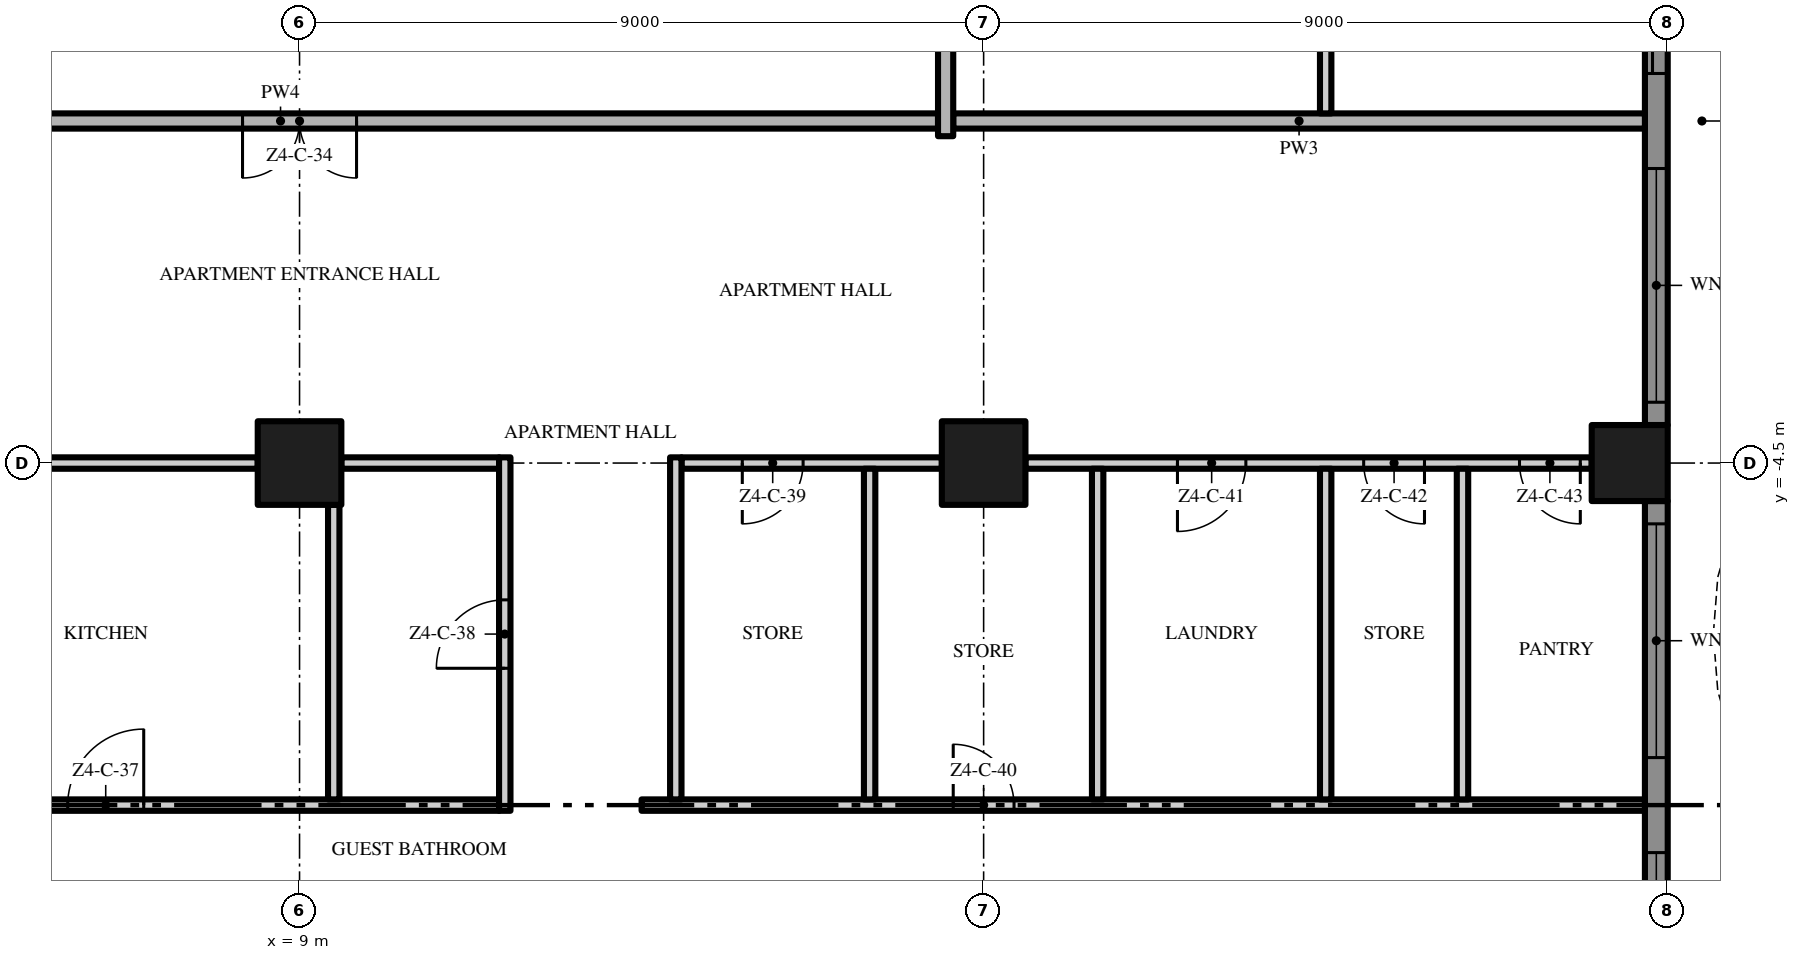
"""IFC4 building model, lengths in metres.
Left out: names, types, materials, properties, quantities, classifications, styles, units other than length and angle.
Written with IfcOpenShell. Run it as: python <this file> out.ifc"""

import sys

from ifc_helpers import new_model, si_unit, direction, frame, frame_2d, origin, origin_2d, place, context, subcontext, project, spatial, polyline, rectangle, outline, extrude, element, fill, save


model = new_model("IFC4")
c1 = context("Model", 3, precision=1e-05, world=origin(), true_north=direction((0.0, 1.0)))
c2 = subcontext(c1, "Body", "Model", "MODEL_VIEW")
j1 = project(units=[si_unit("LENGTHUNIT", "METRE"), si_unit("PLANEANGLEUNIT", "RADIAN")], contexts=[c1])
p1 = place(None, origin())
s1 = spatial("IfcSite", under=j1, at=p1, CompositionType="ELEMENT")
p2 = place(p1, origin())
s2 = spatial("IfcBuilding", under=s1, at=p2, CompositionType="ELEMENT")
p3 = place(p2, frame((0.0, 0.0, 211.0)))
s3 = spatial("IfcBuildingStorey", under=s2, at=p3, CompositionType="ELEMENT", Elevation=211.0)
p4 = place(p3, frame((18.0, -4.5, 0.0), z_axis=(0.0, 0.0, 1.0), x_axis=(1.0, 0.0, 0.0)))
e1 = element("IfcColumn", 1, at=p4, inside=s3, PredefinedType="COLUMN", context=c2, shape_type="SweptSolid", body=[
    extrude(rectangle(XDim=1.1, YDim=1.1, at=origin_2d()), origin(), (0.0, 0.0, 1.0), 3.5),
])
p5 = place(p3, frame((26.5, -4.5, 0.0), z_axis=(0.0, 0.0, 1.0), x_axis=(1.0, 0.0, 0.0)))
e2 = element("IfcColumn", 2, at=p5, inside=s3, PredefinedType="COLUMN", context=c2, shape_type="SweptSolid", body=[
    extrude(rectangle(XDim=1.0, YDim=1.0, at=origin_2d()), origin(), (0.0, 0.0, 1.0), 3.5),
])
p6 = place(p3, frame((9.0, -4.5, 0.0), z_axis=(0.0, 0.0, 1.0), x_axis=(1.0, 0.0, 0.0)))
e3 = element("IfcColumn", 3, at=p6, inside=s3, PredefinedType="COLUMN", context=c2, shape_type="SweptSolid", body=[
    extrude(rectangle(XDim=1.1, YDim=1.1, at=origin_2d()), origin(), (0.0, 0.0, 1.0), 3.5),
])
p7 = place(p3, frame((26.85, -5.0, 0.0), z_axis=(0.0, 0.0, 1.0), x_axis=(0.0, -1.0, 0.0)))
e4 = element("IfcWall", 4, at=p7, inside=s3, PredefinedType="SOLIDWALL", context=c2, shape_type="SweptSolid", body=[
    extrude(rectangle(XDim=8.0, YDim=0.3, at=frame_2d((4.0, 0.0))), origin(), (0.0, 0.0, 1.0), 3.5),
])
p8 = place(p7, frame((4.625, 0.0, 0.45)))
e5 = element("IfcOpeningElement", 5, at=p8, cuts=e4, PredefinedType="OPENING", context=c2, shape_type="SweptSolid", body=[
    extrude(rectangle(XDim=3.075, YDim=2.65, at=frame_2d((1.538, 1.325))), frame((0.0, 0.16, 0.0), z_axis=(0.0, -1.0, 0.0), x_axis=(1.0, 0.0, 0.0)), (0.0, 0.0, 1.0), 0.32),
])
p9 = place(p7, frame((0.3, 0.0, 0.45)))
e6 = element("IfcOpeningElement", 6, at=p9, cuts=e4, PredefinedType="OPENING", context=c2, shape_type="SweptSolid", body=[
    extrude(rectangle(XDim=3.075, YDim=2.65, at=frame_2d((1.538, 1.325))), frame((0.0, 0.16, 0.0), z_axis=(0.0, -1.0, 0.0), x_axis=(1.0, 0.0, 0.0)), (0.0, 0.0, 1.0), 0.32),
])
p10 = place(p3, frame((26.85, 4.0, 0.0), z_axis=(0.0, 0.0, 1.0), x_axis=(0.0, -1.0, 0.0)))
e7 = element("IfcWall", 7, at=p10, inside=s3, PredefinedType="SOLIDWALL", context=c2, shape_type="SweptSolid", body=[
    extrude(rectangle(XDim=8.0, YDim=0.3, at=frame_2d((4.0, 0.0))), origin(), (0.0, 0.0, 1.0), 3.5),
])
p11 = place(p10, frame((4.625, 0.0, 0.45)))
e8 = element("IfcOpeningElement", 8, at=p11, cuts=e7, PredefinedType="OPENING", context=c2, shape_type="SweptSolid", body=[
    extrude(rectangle(XDim=3.075, YDim=2.65, at=frame_2d((1.538, 1.325))), frame((0.0, 0.16, 0.0), z_axis=(0.0, -1.0, 0.0), x_axis=(1.0, 0.0, 0.0)), (0.0, 0.0, 1.0), 0.32),
])
p12 = place(p10, frame((0.3, 0.0, 0.0)))
e9 = element("IfcOpeningElement", 9, at=p12, cuts=e7, PredefinedType="OPENING", context=c2, shape_type="SweptSolid", body=[
    extrude(rectangle(XDim=3.075, YDim=2.4, at=frame_2d((1.538, 1.2))), frame((0.0, 0.16, 0.0), z_axis=(0.0, -1.0, 0.0), x_axis=(1.0, 0.0, 0.0)), (0.0, 0.0, 1.0), 0.32),
])
p13 = place(p3, origin())
e10 = element("IfcWall", 10, at=p13, inside=s3, PredefinedType="USERDEFINED", context=c2, shape_type="SweptSolid", body=[
    extrude(outline(polyline([(28.8, -18.0), (29.505, -16.5), (29.941, -15.0), (30.0, -14.25), (29.941, -13.5), (29.505, -12.0), (28.8, -10.5), (28.095, -9.0), (27.659, -7.5), (27.6, -6.75), (27.659, -6.0), (28.095, -4.5), (28.8, -3.0), (29.505, -1.5), (29.941, 0.0), (30.0, 0.75), (29.941, 1.5), (29.505, 3.0), (28.8, 4.5), (28.095, 6.0), (27.659, 7.5), (27.6, 8.25), (27.659, 9.0), (28.095, 10.5), (28.8, 12.0), (29.505, 13.5), (29.941, 15.0), (30.0, 15.75), (29.941, 16.5), (29.505, 18.0), (29.265, 17.93), (29.694, 16.455), (29.749, 15.75), (29.694, 15.045), (29.271, 13.589), (28.574, 12.106), (27.86, 10.589), (27.411, 9.045), (27.349, 8.25), (27.411, 7.455), (27.86, 5.911), (28.574, 4.394), (29.271, 2.911), (29.694, 1.455), (29.749, 0.75), (29.694, 0.045), (29.271, -1.411), (28.574, -2.894), (27.86, -4.411), (27.411, -5.955), (27.349, -6.75), (27.411, -7.545), (27.86, -9.089), (28.574, -10.606), (29.271, -12.089), (29.694, -13.545), (29.749, -14.25), (29.694, -14.955), (29.271, -16.411), (28.574, -17.894), (28.8, -18.0)])), origin(), (0.0, 0.0, 1.0), 0.9),
])
p14 = place(p3, frame((0.1, -9.0, 0.0), z_axis=(0.0, 0.0, 1.0), x_axis=(1.0, 0.0, 0.0)))
e11 = element("IfcWall", 11, at=p14, inside=s3, PredefinedType="PARTITIONING", context=c2, shape_type="SweptSolid", body=[
    extrude(rectangle(XDim=11.525, YDim=0.15, at=frame_2d((5.763, 0.0))), origin(), (0.0, 0.0, 1.0), 3.5),
])
p15 = place(p14, frame((5.85, 0.0, 0.0)))
e12 = element("IfcOpeningElement", 12, at=p15, cuts=e11, PredefinedType="OPENING", context=c2, shape_type="SweptSolid", body=[
    extrude(rectangle(XDim=1.0, YDim=2.4, at=frame_2d((0.5, 1.2))), frame((0.0, 0.085, 0.0), z_axis=(0.0, -1.0, 0.0), x_axis=(1.0, 0.0, 0.0)), (0.0, 0.0, 1.0), 0.17),
])
p16 = place(p3, frame((13.5, -9.0, 0.0), z_axis=(0.0, 0.0, 1.0), x_axis=(1.0, 0.0, 0.0)))
e13 = element("IfcWall", 13, at=p16, inside=s3, PredefinedType="PARTITIONING", context=c2, shape_type="SweptSolid", body=[
    extrude(rectangle(XDim=13.2, YDim=0.15, at=frame_2d((6.6, 0.0))), origin(), (0.0, 0.0, 1.0), 3.5),
])
p17 = place(p16, frame((4.1, 0.0, 0.0)))
e14 = element("IfcOpeningElement", 14, at=p17, cuts=e13, PredefinedType="OPENING", context=c2, shape_type="SweptSolid", body=[
    extrude(rectangle(XDim=0.8, YDim=2.0, at=frame_2d((0.4, 1.0))), frame((0.0, 0.085, 0.0), z_axis=(0.0, -1.0, 0.0), x_axis=(1.0, 0.0, 0.0)), (0.0, 0.0, 1.0), 0.17),
])
p18 = place(p3, frame((8.45, -4.5, 0.0), z_axis=(0.0, 0.0, 1.0), x_axis=(-1.0, 0.0, 0.0)))
e15 = element("IfcWall", 15, at=p18, inside=s3, PredefinedType="PARTITIONING", context=c2, shape_type="SweptSolid", body=[
    extrude(rectangle(XDim=7.9, YDim=0.15, at=frame_2d((3.95, 0.0))), origin(), (0.0, 0.0, 1.0), 3.5),
])
p19 = place(p18, frame((6.95, 0.0, 0.0)))
e16 = element("IfcOpeningElement", 16, at=p19, cuts=e15, PredefinedType="OPENING", context=c2, shape_type="SweptSolid", body=[
    extrude(rectangle(XDim=0.8, YDim=2.0, at=frame_2d((0.4, 1.0))), frame((0.0, 0.085, 0.0), z_axis=(0.0, -1.0, 0.0), x_axis=(1.0, 0.0, 0.0)), (0.0, 0.0, 1.0), 0.17),
])
p20 = place(p18, frame((5.45, 0.0, 0.0)))
e17 = element("IfcOpeningElement", 17, at=p20, cuts=e15, PredefinedType="OPENING", context=c2, shape_type="SweptSolid", body=[
    extrude(rectangle(XDim=0.8, YDim=2.0, at=frame_2d((0.4, 1.0))), frame((0.0, 0.085, 0.0), z_axis=(0.0, -1.0, 0.0), x_axis=(1.0, 0.0, 0.0)), (0.0, 0.0, 1.0), 0.17),
])
p21 = place(p3, frame((9.55, -4.5, 0.0), z_axis=(0.0, 0.0, 1.0), x_axis=(1.0, 0.0, 0.0)))
e18 = element("IfcWall", 18, at=p21, inside=s3, PredefinedType="PARTITIONING", context=c2, shape_type="SweptSolid", body=[
    extrude(rectangle(XDim=2.075, YDim=0.15, at=frame_2d((1.038, 0.0))), origin(), (0.0, 0.0, 1.0), 3.5),
])
p22 = place(p3, frame((17.45, -4.5, 0.0), z_axis=(0.0, 0.0, 1.0), x_axis=(-1.0, 0.0, 0.0)))
e19 = element("IfcWall", 19, at=p22, inside=s3, PredefinedType="PARTITIONING", context=c2, shape_type="SweptSolid", body=[
    extrude(rectangle(XDim=3.425, YDim=0.15, at=frame_2d((1.712, 0.0))), origin(), (0.0, 0.0, 1.0), 3.5),
])
p23 = place(p22, frame((1.825, 0.0, 0.0)))
e20 = element("IfcOpeningElement", 20, at=p23, cuts=e19, PredefinedType="OPENING", context=c2, shape_type="SweptSolid", body=[
    extrude(rectangle(XDim=0.8, YDim=2.0, at=frame_2d((0.4, 1.0))), frame((0.0, 0.085, 0.0), z_axis=(0.0, -1.0, 0.0), x_axis=(1.0, 0.0, 0.0)), (0.0, 0.0, 1.0), 0.17),
])
p24 = place(p3, frame((26.0, -4.5, 0.0), z_axis=(0.0, 0.0, 1.0), x_axis=(-1.0, 0.0, 0.0)))
e21 = element("IfcWall", 21, at=p24, inside=s3, PredefinedType="PARTITIONING", context=c2, shape_type="SweptSolid", body=[
    extrude(rectangle(XDim=7.45, YDim=0.15, at=frame_2d((3.725, 0.0))), origin(), (0.0, 0.0, 1.0), 3.5),
])
p25 = place(p24, frame((4.55, 0.0, 0.0)))
e22 = element("IfcOpeningElement", 22, at=p25, cuts=e21, PredefinedType="OPENING", context=c2, shape_type="SweptSolid", body=[
    extrude(rectangle(XDim=0.9, YDim=2.1, at=frame_2d((0.45, 1.05))), frame((0.0, 0.085, 0.0), z_axis=(0.0, -1.0, 0.0), x_axis=(1.0, 0.0, 0.0)), (0.0, 0.0, 1.0), 0.17),
])
p26 = place(p24, frame((2.2, 0.0, 0.0)))
e23 = element("IfcOpeningElement", 23, at=p26, cuts=e21, PredefinedType="OPENING", context=c2, shape_type="SweptSolid", body=[
    extrude(rectangle(XDim=0.8, YDim=2.0, at=frame_2d((0.4, 1.0))), frame((0.0, 0.085, 0.0), z_axis=(0.0, -1.0, 0.0), x_axis=(1.0, 0.0, 0.0)), (0.0, 0.0, 1.0), 0.17),
])
p27 = place(p24, frame((0.15, 0.0, 0.0)))
e24 = element("IfcOpeningElement", 24, at=p27, cuts=e21, PredefinedType="OPENING", context=c2, shape_type="SweptSolid", body=[
    extrude(rectangle(XDim=0.8, YDim=2.0, at=frame_2d((0.4, 1.0))), frame((0.0, 0.085, 0.0), z_axis=(0.0, -1.0, 0.0), x_axis=(1.0, 0.0, 0.0)), (0.0, 0.0, 1.0), 0.17),
])
p28 = place(p3, frame((17.4, 0.0, 0.0), z_axis=(0.0, 0.0, 1.0), x_axis=(-1.0, 0.0, 0.0)))
e25 = element("IfcWall", 25, at=p28, inside=s3, PredefinedType="PARTITIONING", context=c2, shape_type="SweptSolid", body=[
    extrude(rectangle(XDim=17.3, YDim=0.2, at=frame_2d((8.65, 0.0))), origin(), (0.0, 0.0, 1.0), 3.5),
])
p29 = place(p28, frame((7.65, 0.0, 0.0)))
e26 = element("IfcOpeningElement", 26, at=p29, cuts=e25, PredefinedType="OPENING", context=c2, shape_type="SweptSolid", body=[
    extrude(rectangle(XDim=1.5, YDim=2.4, at=frame_2d((0.75, 1.2))), frame((0.0, 0.11, 0.0), z_axis=(0.0, -1.0, 0.0), x_axis=(1.0, 0.0, 0.0)), (0.0, 0.0, 1.0), 0.22),
])
p30 = place(p3, frame((17.6, 0.0, 0.0), z_axis=(0.0, 0.0, 1.0), x_axis=(1.0, 0.0, 0.0)))
e27 = element("IfcWall", 27, at=p30, inside=s3, PredefinedType="PARTITIONING", context=c2, shape_type="SweptSolid", body=[
    extrude(rectangle(XDim=9.1, YDim=0.2, at=frame_2d((4.55, 0.0))), origin(), (0.0, 0.0, 1.0), 3.5),
])
p31 = place(p3, frame((9.45, -8.925, 0.0), z_axis=(0.0, 0.0, 1.0), x_axis=(0.0, 1.0, 0.0)))
e28 = element("IfcWall", 28, at=p31, inside=s3, PredefinedType="PARTITIONING", context=c2, shape_type="SweptSolid", body=[
    extrude(rectangle(XDim=3.875, YDim=0.15, at=frame_2d((1.938, 0.0))), origin(), (0.0, 0.0, 1.0), 3.5),
])
p32 = place(p3, frame((11.7, -9.075, 0.0), z_axis=(0.0, 0.0, 1.0), x_axis=(0.0, 1.0, 0.0)))
e29 = element("IfcWall", 29, at=p32, inside=s3, PredefinedType="PARTITIONING", context=c2, shape_type="SweptSolid", body=[
    extrude(rectangle(XDim=4.65, YDim=0.15, at=frame_2d((2.325, 0.0))), origin(), (0.0, 0.0, 1.0), 3.5),
])
p33 = place(p32, frame((1.875, 0.0, 0.0)))
e30 = element("IfcOpeningElement", 30, at=p33, cuts=e29, PredefinedType="OPENING", context=c2, shape_type="SweptSolid", body=[
    extrude(rectangle(XDim=0.9, YDim=2.1, at=frame_2d((0.45, 1.05))), frame((0.0, 0.085, 0.0), z_axis=(0.0, -1.0, 0.0), x_axis=(1.0, 0.0, 0.0)), (0.0, 0.0, 1.0), 0.17),
])
p34 = place(p3, frame((13.95, -8.925, 0.0), z_axis=(0.0, 0.0, 1.0), x_axis=(0.0, 1.0, 0.0)))
e31 = element("IfcWall", 31, at=p34, inside=s3, PredefinedType="PARTITIONING", context=c2, shape_type="SweptSolid", body=[
    extrude(rectangle(XDim=4.5, YDim=0.15, at=frame_2d((2.25, 0.0))), origin(), (0.0, 0.0, 1.0), 3.5),
])
p35 = place(p3, frame((16.5, -8.925, 0.0), z_axis=(0.0, 0.0, 1.0), x_axis=(0.0, 1.0, 0.0)))
e32 = element("IfcWall", 32, at=p35, inside=s3, PredefinedType="PARTITIONING", context=c2, shape_type="SweptSolid", body=[
    extrude(rectangle(XDim=4.35, YDim=0.15, at=frame_2d((2.175, 0.0))), origin(), (0.0, 0.0, 1.0), 3.5),
])
p36 = place(p3, frame((17.5, -0.2, 0.0), z_axis=(0.0, 0.0, 1.0), x_axis=(0.0, 1.0, 0.0)))
e33 = element("IfcWall", 33, at=p36, inside=s3, PredefinedType="PARTITIONING", context=c2, shape_type="SweptSolid", body=[
    extrude(rectangle(XDim=4.15, YDim=0.2, at=frame_2d((2.075, 0.0))), origin(), (0.0, 0.0, 1.0), 3.5),
])
for number, where, z_axis, x_axis in (
    (34, (19.5, -8.925, 0.0), (0.0, 0.0, 1.0), (0.0, 1.0, 0.0)),
    (35, (22.5, -8.925, 0.0), (0.0, 0.0, 1.0), (0.0, 1.0, 0.0)),
):
    element("IfcWall", number, at=place(p3, frame(where, z_axis=z_axis, x_axis=x_axis)), inside=s3, PredefinedType="PARTITIONING", context=c2, shape_type="SweptSolid", body=[
        extrude(rectangle(XDim=4.35, YDim=0.15, at=frame_2d((2.175, 0.0))), origin(), (0.0, 0.0, 1.0), 3.5),
    ])
p37 = place(p3, frame((22.5, 17.5, 0.0), z_axis=(0.0, 0.0, 1.0), x_axis=(0.0, -1.0, 0.0)))
e36 = element("IfcWall", 36, at=p37, inside=s3, PredefinedType="PARTITIONING", context=c2, shape_type="SweptSolid", body=[
    extrude(rectangle(XDim=17.4, YDim=0.15, at=frame_2d((8.7, 0.0))), origin(), (0.0, 0.0, 1.0), 3.5),
])
p38 = place(p37, frame((14.75, 0.0, 0.0)))
e37 = element("IfcOpeningElement", 37, at=p38, cuts=e36, PredefinedType="OPENING", context=c2, shape_type="SweptSolid", body=[
    extrude(rectangle(XDim=1.0, YDim=2.4, at=frame_2d((0.5, 1.2))), frame((0.0, 0.085, 0.0), z_axis=(0.0, -1.0, 0.0), x_axis=(1.0, 0.0, 0.0)), (0.0, 0.0, 1.0), 0.17),
])
p39 = place(p37, frame((11.4, 0.0, 0.0)))
e38 = element("IfcOpeningElement", 38, at=p39, cuts=e36, PredefinedType="OPENING", context=c2, shape_type="SweptSolid", body=[
    extrude(rectangle(XDim=1.0, YDim=2.4, at=frame_2d((0.5, 1.2))), frame((0.0, 0.085, 0.0), z_axis=(0.0, -1.0, 0.0), x_axis=(1.0, 0.0, 0.0)), (0.0, 0.0, 1.0), 0.17),
])
p40 = place(p37, frame((4.25, 0.0, 0.0)))
e39 = element("IfcOpeningElement", 39, at=p40, cuts=e36, PredefinedType="OPENING", context=c2, shape_type="SweptSolid", body=[
    extrude(rectangle(XDim=1.0, YDim=2.4, at=frame_2d((0.5, 1.2))), frame((0.0, 0.085, 0.0), z_axis=(0.0, -1.0, 0.0), x_axis=(1.0, 0.0, 0.0)), (0.0, 0.0, 1.0), 0.17),
])
p41 = place(p3, frame((24.3, -8.925, 0.0), z_axis=(0.0, 0.0, 1.0), x_axis=(0.0, 1.0, 0.0)))
e40 = element("IfcWall", 40, at=p41, inside=s3, PredefinedType="PARTITIONING", context=c2, shape_type="SweptSolid", body=[
    extrude(rectangle(XDim=4.35, YDim=0.15, at=frame_2d((2.175, 0.0))), origin(), (0.0, 0.0, 1.0), 3.5),
])
p42 = place(p8, origin())
e41 = element("IfcWindow", 41, at=p42, inside=s3, PartitioningType="SINGLE_PANEL", PredefinedType="WINDOW", context=c2, shape_type="SweptSolid", body=[
    extrude(rectangle(XDim=3.075, YDim=2.65, at=frame_2d((1.538, 1.325))), frame((0.0, 0.03, 0.0), z_axis=(0.0, -1.0, 0.0), x_axis=(1.0, 0.0, 0.0)), (0.0, 0.0, 1.0), 0.06),
])
fill(e5, e41)
p43 = place(p9, origin())
e42 = element("IfcWindow", 42, at=p43, inside=s3, PartitioningType="SINGLE_PANEL", PredefinedType="WINDOW", context=c2, shape_type="SweptSolid", body=[
    extrude(rectangle(XDim=3.075, YDim=2.65, at=frame_2d((1.538, 1.325))), frame((0.0, 0.03, 0.0), z_axis=(0.0, -1.0, 0.0), x_axis=(1.0, 0.0, 0.0)), (0.0, 0.0, 1.0), 0.06),
])
fill(e6, e42)
p44 = place(p11, origin())
e43 = element("IfcWindow", 43, at=p44, inside=s3, PartitioningType="SINGLE_PANEL", PredefinedType="WINDOW", context=c2, shape_type="SweptSolid", body=[
    extrude(rectangle(XDim=3.075, YDim=2.65, at=frame_2d((1.538, 1.325))), frame((0.0, 0.03, 0.0), z_axis=(0.0, -1.0, 0.0), x_axis=(1.0, 0.0, 0.0)), (0.0, 0.0, 1.0), 0.06),
])
fill(e8, e43)
p45 = place(p12, origin())
e44 = element("IfcDoor", 44, at=p45, inside=s3, OperationType="SINGLE_SWING_LEFT", PredefinedType="DOOR", context=c2, shape_type="SweptSolid", body=[
    extrude(rectangle(XDim=3.075, YDim=2.4, at=frame_2d((1.538, 1.2))), frame((0.0, 0.025, 0.0), z_axis=(0.0, -1.0, 0.0), x_axis=(1.0, 0.0, 0.0)), (0.0, 0.0, 1.0), 0.05),
])
fill(e9, e44)
p46 = place(p29, origin())
e45 = element("IfcDoor", 45, at=p46, inside=s3, OperationType="DOUBLE_DOOR_SINGLE_SWING", PredefinedType="DOOR", context=c2, shape_type="SweptSolid", body=[
    extrude(rectangle(XDim=1.5, YDim=2.4, at=frame_2d((0.75, 1.2))), frame((0.0, 0.025, 0.0), z_axis=(0.0, -1.0, 0.0), x_axis=(1.0, 0.0, 0.0)), (0.0, 0.0, 1.0), 0.05),
])
fill(e26, e45)
p47 = place(p15, origin())
e46 = element("IfcDoor", 46, at=p47, inside=s3, OperationType="SINGLE_SWING_RIGHT", PredefinedType="DOOR", context=c2, shape_type="SweptSolid", body=[
    extrude(rectangle(XDim=1.0, YDim=2.4, at=frame_2d((0.5, 1.2))), frame((0.0, 0.025, 0.0), z_axis=(0.0, -1.0, 0.0), x_axis=(1.0, 0.0, 0.0)), (0.0, 0.0, 1.0), 0.05),
])
fill(e12, e46)
p48 = place(p33, origin())
e47 = element("IfcDoor", 47, at=p48, inside=s3, OperationType="SINGLE_SWING_LEFT", PredefinedType="DOOR", context=c2, shape_type="SweptSolid", body=[
    extrude(rectangle(XDim=0.9, YDim=2.1, at=frame_2d((0.45, 1.05))), frame((0.0, 0.025, 0.0), z_axis=(0.0, -1.0, 0.0), x_axis=(1.0, 0.0, 0.0)), (0.0, 0.0, 1.0), 0.05),
])
fill(e30, e47)
p49 = place(p23, origin())
e48 = element("IfcDoor", 48, at=p49, inside=s3, OperationType="SINGLE_SWING_RIGHT", PredefinedType="DOOR", context=c2, shape_type="SweptSolid", body=[
    extrude(rectangle(XDim=0.8, YDim=2.0, at=frame_2d((0.4, 1.0))), frame((0.0, 0.025, 0.0), z_axis=(0.0, -1.0, 0.0), x_axis=(1.0, 0.0, 0.0)), (0.0, 0.0, 1.0), 0.05),
])
fill(e20, e48)
p50 = place(p17, origin())
e49 = element("IfcDoor", 49, at=p50, inside=s3, OperationType="SINGLE_SWING_LEFT", PredefinedType="DOOR", context=c2, shape_type="SweptSolid", body=[
    extrude(rectangle(XDim=0.8, YDim=2.0, at=frame_2d((0.4, 1.0))), frame((0.0, 0.025, 0.0), z_axis=(0.0, -1.0, 0.0), x_axis=(1.0, 0.0, 0.0)), (0.0, 0.0, 1.0), 0.05),
])
fill(e14, e49)
p51 = place(p25, origin())
e50 = element("IfcDoor", 50, at=p51, inside=s3, OperationType="SINGLE_SWING_RIGHT", PredefinedType="DOOR", context=c2, shape_type="SweptSolid", body=[
    extrude(rectangle(XDim=0.9, YDim=2.1, at=frame_2d((0.45, 1.05))), frame((0.0, 0.025, 0.0), z_axis=(0.0, -1.0, 0.0), x_axis=(1.0, 0.0, 0.0)), (0.0, 0.0, 1.0), 0.05),
])
fill(e22, e50)
p52 = place(p26, origin())
e51 = element("IfcDoor", 51, at=p52, inside=s3, OperationType="SINGLE_SWING_LEFT", PredefinedType="DOOR", context=c2, shape_type="SweptSolid", body=[
    extrude(rectangle(XDim=0.8, YDim=2.0, at=frame_2d((0.4, 1.0))), frame((0.0, 0.025, 0.0), z_axis=(0.0, -1.0, 0.0), x_axis=(1.0, 0.0, 0.0)), (0.0, 0.0, 1.0), 0.05),
])
fill(e23, e51)
p53 = place(p27, origin())
e52 = element("IfcDoor", 52, at=p53, inside=s3, OperationType="SINGLE_SWING_LEFT", PredefinedType="DOOR", context=c2, shape_type="SweptSolid", body=[
    extrude(rectangle(XDim=0.8, YDim=2.0, at=frame_2d((0.4, 1.0))), frame((0.0, 0.025, 0.0), z_axis=(0.0, -1.0, 0.0), x_axis=(1.0, 0.0, 0.0)), (0.0, 0.0, 1.0), 0.05),
])
fill(e24, e52)
save(model, sys.argv[1])
